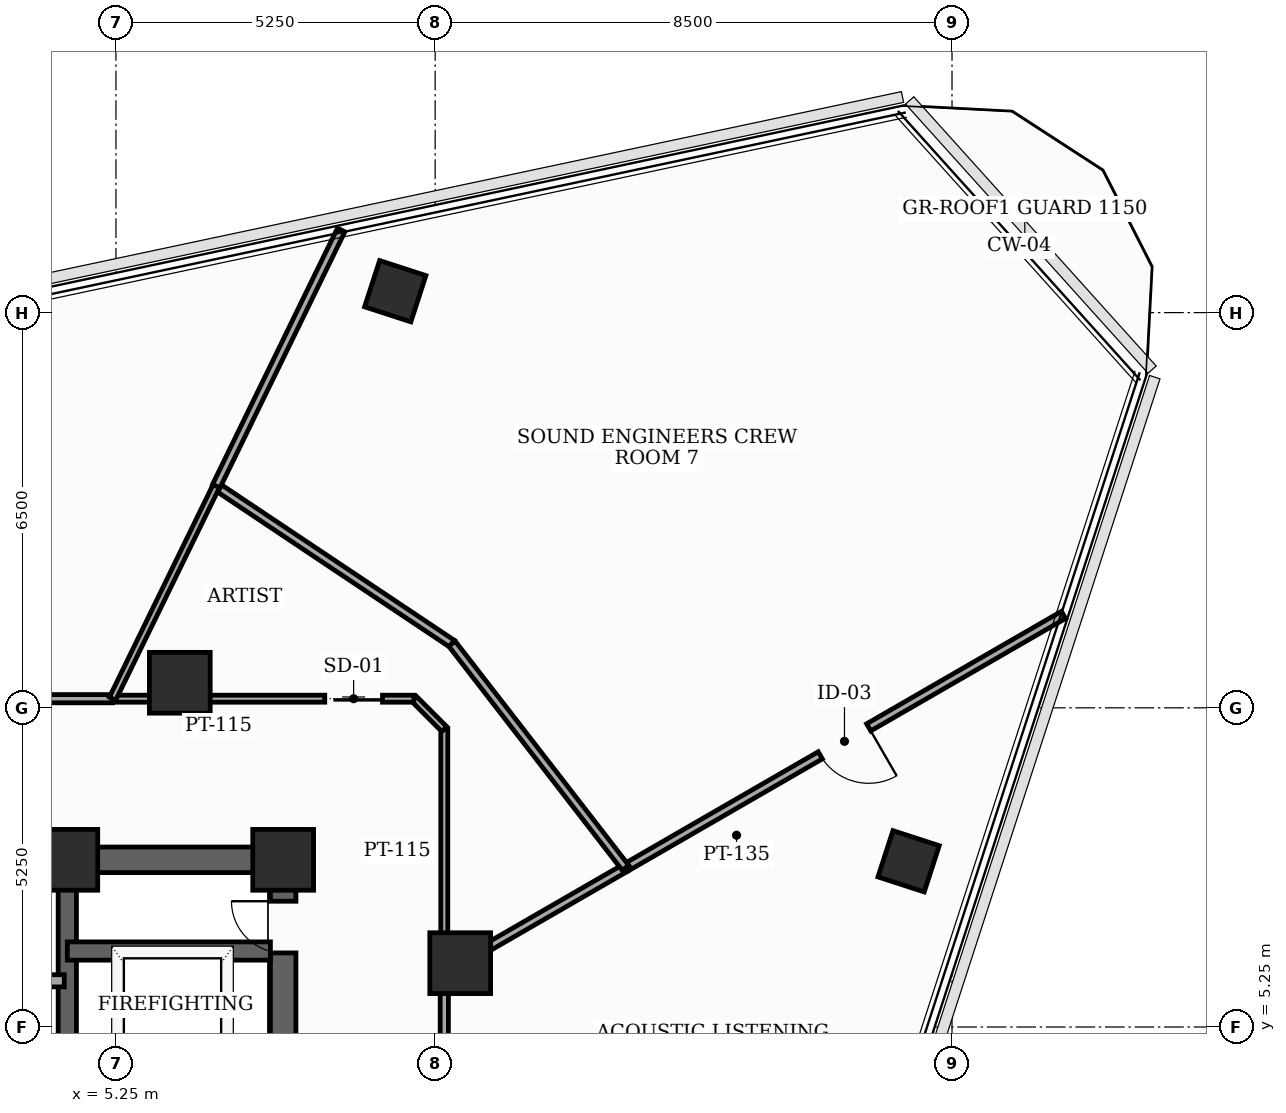
"""IFC4 building model, lengths in metres.
Left out: names, types, materials, properties, quantities, classifications, styles, units other than length and angle.
Written with IfcOpenShell. Run it as: python <this file> out.ifc"""

import sys

from ifc_helpers import new_model, si_unit, direction, frame, frame_2d, origin, origin_2d, place, context, subcontext, project, spatial, rectangle, extrude, element, fill, save


model = new_model("IFC4")
c1 = context("Model", 3, precision=1e-05, world=origin(), true_north=direction((0.0, 1.0)))
c2 = subcontext(c1, "Body", "Model", "MODEL_VIEW")
j1 = project(units=[si_unit("LENGTHUNIT", "METRE"), si_unit("PLANEANGLEUNIT", "RADIAN")], contexts=[c1])
p1 = place(None, origin())
s1 = spatial("IfcSite", under=j1, at=p1, CompositionType="ELEMENT")
p2 = place(p1, origin())
s2 = spatial("IfcBuilding", under=s1, at=p2, CompositionType="ELEMENT")
p3 = place(p2, frame((0.0, 0.0, 309.1)))
s3 = spatial("IfcBuildingStorey", under=s2, at=p3, CompositionType="ELEMENT", Elevation=309.1)
for number, where, z_axis, x_axis in (
    (1, (8.0, 8.0, 0.0), (0.0, 0.0, 1.0), (1.0, 0.0, 0.0)),
    (2, (4.45, 8.0, 0.0), (0.0, 0.0, 1.0), (1.0, 0.0, 0.0)),
    (3, (10.912, 6.3, 0.0), (0.0, 0.0, 1.0), (1.0, 0.0, 0.0)),
    (4, (6.3, 10.912, 0.0), (0.0, 0.0, 1.0), (1.0, 0.0, 0.0)),
):
    element("IfcColumn", number, at=place(p3, frame(where, z_axis=z_axis, x_axis=x_axis)), inside=s3, PredefinedType="COLUMN", context=c2, shape_type="SweptSolid", body=[
        extrude(rectangle(XDim=1.0, YDim=1.0, at=origin_2d()), origin(), (0.0, 0.0, 1.0), 3.7),
    ])
for number, where, z_axis, x_axis in (
    (5, (18.286, 7.976, 0.0), (0.0, 0.0, 1.0), (0.309, 0.951, 0.0)),
    (6, (9.844, 17.352, 0.0), (0.0, 0.0, 1.0), (0.309, 0.951, 0.0)),
):
    element("IfcColumn", number, at=place(p3, frame(where, z_axis=z_axis, x_axis=x_axis)), inside=s3, PredefinedType="COLUMN", context=c2, shape_type="SweptSolid", body=[
        extrude(rectangle(XDim=0.8, YDim=0.8, at=origin_2d()), origin(), (0.0, 0.0, 1.0), 3.7),
    ])
p4 = place(p3, frame((8.0, -8.0, 0.0), z_axis=(0.0, 0.0, 1.0), x_axis=(0.0, 1.0, 0.0)))
e7 = element("IfcWall", 7, at=p4, inside=s3, PredefinedType="SHEAR", context=c2, shape_type="SweptSolid", body=[
    extrude(rectangle(XDim=16.0, YDim=0.42, at=frame_2d((8.0, 0.0))), origin(), (0.0, 0.0, 1.0), 3.44),
])
p5 = place(p4, frame((9.6, 0.0, 0.0)))
e8 = element("IfcOpeningElement", 8, at=p5, cuts=e7, PredefinedType="OPENING", context=c2, shape_type="SweptSolid", body=[
    extrude(rectangle(XDim=1.05, YDim=2.15, at=frame_2d((0.525, 1.075))), frame((0.0, 0.22, 0.0), z_axis=(0.0, -1.0, 0.0), x_axis=(1.0, 0.0, 0.0)), (0.0, 0.0, 1.0), 0.44),
])
p6 = place(p4, frame((14.469, 0.0, 0.0)))
e9 = element("IfcOpeningElement", 9, at=p6, cuts=e7, PredefinedType="OPENING", context=c2, shape_type="SweptSolid", body=[
    extrude(rectangle(XDim=0.85, YDim=2.02, at=frame_2d((0.425, 1.01))), frame((0.0, 0.22, 0.0), z_axis=(0.0, -1.0, 0.0), x_axis=(1.0, 0.0, 0.0)), (0.0, 0.0, 1.0), 0.44),
])
p7 = place(p3, frame((-8.0, 8.0, 0.0), z_axis=(0.0, 0.0, 1.0), x_axis=(1.0, 0.0, 0.0)))
e10 = element("IfcWall", 10, at=p7, inside=s3, PredefinedType="SHEAR", context=c2, shape_type="SweptSolid", body=[
    extrude(rectangle(XDim=16.0, YDim=0.42, at=frame_2d((8.0, 0.0))), origin(), (0.0, 0.0, 1.0), 3.44),
])
p8 = place(p7, frame((7.1, 0.0, 0.0)))
e11 = element("IfcOpeningElement", 11, at=p8, cuts=e10, PredefinedType="OPENING", context=c2, shape_type="SweptSolid", body=[
    extrude(rectangle(XDim=1.8, YDim=2.15, at=frame_2d((0.9, 1.075))), frame((0.0, 0.22, 0.0), z_axis=(0.0, -1.0, 0.0), x_axis=(1.0, 0.0, 0.0)), (0.0, 0.0, 1.0), 0.44),
])
p9 = place(p3, frame((4.45, -7.79, 0.0), z_axis=(0.0, 0.0, 1.0), x_axis=(0.0, 1.0, 0.0)))
e12 = element("IfcWall", 12, at=p9, inside=s3, PredefinedType="SHEAR", context=c2, shape_type="SweptSolid", body=[
    extrude(rectangle(XDim=15.58, YDim=0.3, at=frame_2d((7.79, 0.0))), origin(), (0.0, 0.0, 1.0), 3.44),
])
p10 = place(p3, frame((4.45, 6.5, 0.0), z_axis=(0.0, 0.0, 1.0), x_axis=(1.0, 0.0, 0.0)))
e13 = element("IfcWall", 13, at=p10, inside=s3, PredefinedType="SHEAR", context=c2, shape_type="SweptSolid", body=[
    extrude(rectangle(XDim=3.34, YDim=0.3, at=frame_2d((1.67, 0.0))), origin(), (0.0, 0.0, 1.0), 3.44),
])
p11 = place(p3, frame((1.72, 6.01, 0.0), z_axis=(0.0, 0.0, 1.0), x_axis=(1.0, 0.0, 0.0)))
e14 = element("IfcWall", 14, at=p11, inside=s3, PredefinedType="SOLIDWALL", context=c2, shape_type="SweptSolid", body=[
    extrude(rectangle(XDim=2.68, YDim=0.2, at=frame_2d((1.34, 0.0))), origin(), (0.0, 0.0, 1.0), 3.44),
])
p12 = place(p3, frame((10.65, 2.45, 0.0), z_axis=(0.0, 0.0, 1.0), x_axis=(0.0, 1.0, 0.0)))
e15 = element("IfcWall", 15, at=p12, inside=s3, PredefinedType="PARTITIONING", context=c2, shape_type="SweptSolid", body=[
    extrude(rectangle(XDim=3.699, YDim=0.135, at=frame_2d((1.85, 0.0))), origin(), (0.0, 0.0, 1.0), 2.04),
])
p13 = place(p12, frame((0.561, 0.0, 0.0)))
e16 = element("IfcOpeningElement", 16, at=p13, cuts=e15, PredefinedType="OPENING", context=c2, shape_type="SweptSolid", body=[
    extrude(rectangle(XDim=0.95, YDim=2.0, at=frame_2d((0.475, 1.0))), frame((0.0, 0.077, 0.0), z_axis=(0.0, -1.0, 0.0), x_axis=(1.0, 0.0, 0.0)), (0.0, 0.0, 1.0), 0.155),
])
p14 = place(p3, frame((10.65, 6.149, 0.0), z_axis=(0.0, 0.0, 1.0), x_axis=(0.0, 1.0, 0.0)))
e17 = element("IfcWall", 17, at=p14, inside=s3, PredefinedType="PARTITIONING", context=c2, shape_type="SweptSolid", body=[
    extrude(rectangle(XDim=4.001, YDim=0.115, at=frame_2d((2.0, 0.0))), origin(), (0.0, 0.0, 1.0), 2.04),
])
p15 = place(p3, frame((10.65, 10.15, 0.0), z_axis=(0.0, 0.0, 1.0), x_axis=(-0.707106781187, 0.707106781187, 0.0)))
e18 = element("IfcWall", 18, at=p15, inside=s3, PredefinedType="PARTITIONING", context=c2, shape_type="SweptSolid", body=[
    extrude(rectangle(XDim=0.707, YDim=0.115, at=frame_2d((0.354, 0.0))), origin(), (0.0, 0.0, 1.0), 3.44),
])
p16 = place(p3, frame((10.15, 10.65, 0.0), z_axis=(0.0, 0.0, 1.0), x_axis=(-1.0, 0.0, 0.0)))
e19 = element("IfcWall", 19, at=p16, inside=s3, PredefinedType="PARTITIONING", context=c2, shape_type="SweptSolid", body=[
    extrude(rectangle(XDim=4.956, YDim=0.115, at=frame_2d((2.478, 0.0))), origin(), (0.0, 0.0, 1.0), 2.04),
])
p17 = place(p16, frame((0.516, 0.0, 0.0)))
e20 = element("IfcOpeningElement", 20, at=p17, cuts=e19, PredefinedType="OPENING", context=c2, shape_type="SweptSolid", body=[
    extrude(rectangle(XDim=0.95, YDim=2.0, at=frame_2d((0.475, 1.0))), frame((0.0, 0.067, 0.0), z_axis=(0.0, -1.0, 0.0), x_axis=(1.0, 0.0, 0.0)), (0.0, 0.0, 1.0), 0.135),
])
p18 = place(p3, frame((5.194, 10.65, 0.0), z_axis=(0.0, 0.0, 1.0), x_axis=(-1.0, 0.0, 0.0)))
e21 = element("IfcWall", 21, at=p18, inside=s3, PredefinedType="PARTITIONING", context=c2, shape_type="SweptSolid", body=[
    extrude(rectangle(XDim=6.344, YDim=0.135, at=frame_2d((3.172, 0.0))), origin(), (0.0, 0.0, 1.0), 2.04),
])
p19 = place(p18, frame((2.697, 0.0, 0.0)))
e22 = element("IfcOpeningElement", 22, at=p19, cuts=e21, PredefinedType="OPENING", context=c2, shape_type="SweptSolid", body=[
    extrude(rectangle(XDim=0.95, YDim=2.0, at=frame_2d((0.475, 1.0))), frame((0.0, 0.077, 0.0), z_axis=(0.0, -1.0, 0.0), x_axis=(1.0, 0.0, 0.0)), (0.0, 0.0, 1.0), 0.155),
])
p20 = place(p3, frame((20.833, 12.028, 0.0), z_axis=(0.0, 0.0, 1.0), x_axis=(-0.866007163819, -0.500031591216, 0.0)))
e23 = element("IfcWall", 23, at=p20, inside=s3, PredefinedType="PARTITIONING", context=c2, shape_type="SweptSolid", body=[
    extrude(rectangle(XDim=8.317, YDim=0.135, at=frame_2d((4.159, 0.0))), origin(), (0.0, 0.0, 1.0), 2.04),
])
p21 = place(p20, frame((3.698, 0.0, 0.0)))
e24 = element("IfcOpeningElement", 24, at=p21, cuts=e23, PredefinedType="OPENING", context=c2, shape_type="SweptSolid", body=[
    extrude(rectangle(XDim=0.92, YDim=2.0, at=frame_2d((0.46, 1.0))), frame((0.0, 0.077, 0.0), z_axis=(0.0, -1.0, 0.0), x_axis=(1.0, 0.0, 0.0)), (0.0, 0.0, 1.0), 0.155),
])
p22 = place(p3, frame((13.63, 7.869, 0.0), z_axis=(0.0, 0.0, 1.0), x_axis=(-0.866091067331, -0.499886250151, 0.0)))
e25 = element("IfcWall", 25, at=p22, inside=s3, PredefinedType="PARTITIONING", context=c2, shape_type="SweptSolid", body=[
    extrude(rectangle(XDim=3.441, YDim=0.135, at=frame_2d((1.72, 0.0))), origin(), (0.0, 0.0, 1.0), 2.04),
])
p23 = place(p3, frame((6.899, 14.145, 0.0), z_axis=(0.0, 0.0, 1.0), x_axis=(0.831510168033, -0.555509532283, 0.0)))
e26 = element("IfcWall", 26, at=p23, inside=s3, PredefinedType="PARTITIONING", context=c2, shape_type="SweptSolid", body=[
    extrude(rectangle(XDim=4.663, YDim=0.135, at=frame_2d((2.331, 0.0))), origin(), (0.0, 0.0, 1.0), 2.04),
])
p24 = place(p3, frame((10.776, 11.555, 0.0), z_axis=(0.0, 0.0, 1.0), x_axis=(0.612213330569, -0.790692631731, 0.0)))
e27 = element("IfcWall", 27, at=p24, inside=s3, PredefinedType="PARTITIONING", context=c2, shape_type="SweptSolid", body=[
    extrude(rectangle(XDim=4.662, YDim=0.135, at=frame_2d((2.331, 0.0))), origin(), (0.0, 0.0, 1.0), 3.44),
])
p25 = place(p3, frame((8.954, 18.359, 0.0), z_axis=(0.0, 0.0, 1.0), x_axis=(-0.438339504666, -0.898809478504, 0.0)))
e28 = element("IfcWall", 28, at=p25, inside=s3, PredefinedType="PARTITIONING", context=c2, shape_type="SweptSolid", body=[
    extrude(rectangle(XDim=4.688, YDim=0.135, at=frame_2d((2.344, 0.0))), origin(), (0.0, 0.0, 1.0), 2.04),
])
p26 = place(p3, frame((6.899, 14.145, 0.0), z_axis=(0.0, 0.0, 1.0), x_axis=(-0.438402604201, -0.898778702813, 0.0)))
e29 = element("IfcWall", 29, at=p26, inside=s3, PredefinedType="PARTITIONING", context=c2, shape_type="SweptSolid", body=[
    extrude(rectangle(XDim=3.889, YDim=0.115, at=frame_2d((1.944, 0.0))), origin(), (0.0, 0.0, 1.0), 2.04),
])
p27 = place(p6, origin())
e30 = element("IfcDoor", 30, at=p27, inside=s3, OperationType="SINGLE_SWING_RIGHT", PredefinedType="TRAPDOOR", context=c2, shape_type="SweptSolid", body=[
    extrude(rectangle(XDim=0.85, YDim=2.02, at=frame_2d((0.425, 1.01))), frame((0.0, 0.025, 0.0), z_axis=(0.0, -1.0, 0.0), x_axis=(1.0, 0.0, 0.0)), (0.0, 0.0, 1.0), 0.05),
])
fill(e9, e30)
p28 = place(p17, origin())
e31 = element("IfcDoor", 31, at=p28, inside=s3, OperationType="SLIDING_TO_LEFT", PredefinedType="DOOR", context=c2, shape_type="SweptSolid", body=[
    extrude(rectangle(XDim=0.95, YDim=2.0, at=frame_2d((0.475, 1.0))), frame((0.0, 0.025, 0.0), z_axis=(0.0, -1.0, 0.0), x_axis=(1.0, 0.0, 0.0)), (0.0, 0.0, 1.0), 0.05),
])
fill(e20, e31)
p29 = place(p21, origin())
e32 = element("IfcDoor", 32, at=p29, inside=s3, OperationType="SINGLE_SWING_LEFT", PredefinedType="DOOR", context=c2, shape_type="SweptSolid", body=[
    extrude(rectangle(XDim=0.92, YDim=2.0, at=frame_2d((0.46, 1.0))), frame((0.0, 0.025, 0.0), z_axis=(0.0, -1.0, 0.0), x_axis=(1.0, 0.0, 0.0)), (0.0, 0.0, 1.0), 0.05),
])
fill(e24, e32)
save(model, sys.argv[1])
